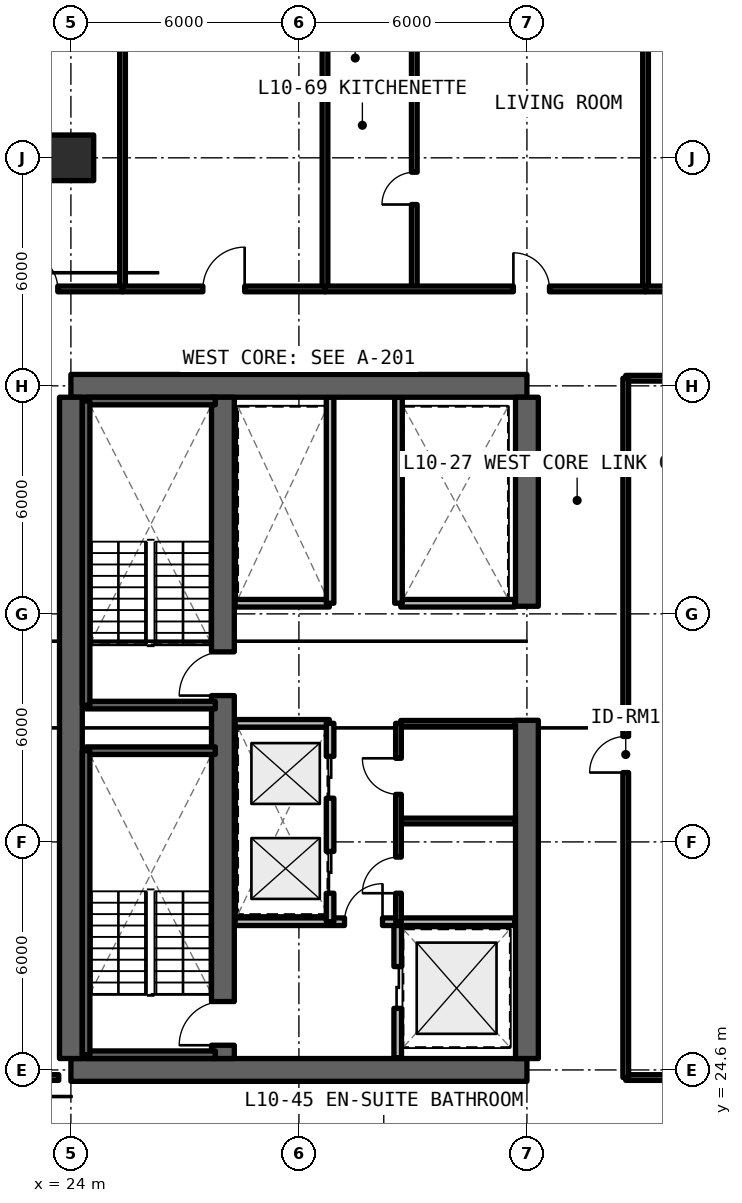
"""IFC4 building model, lengths in metres.
Left out: names, types, materials, properties, quantities, classifications, styles, units other than length and angle.
Written with IfcOpenShell. Run it as: python <this file> out.ifc"""

import sys

from ifc_helpers import new_model, si_unit, direction, frame, frame_2d, origin, origin_2d, place, context, subcontext, project, spatial, rectangle, extrude, element, fill, save


model = new_model("IFC4")
c1 = context("Model", 3, precision=1e-05, world=origin(), true_north=direction((0.0, 1.0)))
c2 = subcontext(c1, "Body", "Model", "MODEL_VIEW")
j1 = project(units=[si_unit("LENGTHUNIT", "METRE"), si_unit("PLANEANGLEUNIT", "RADIAN")], contexts=[c1])
p1 = place(None, origin())
s1 = spatial("IfcSite", under=j1, at=p1, CompositionType="ELEMENT")
p2 = place(p1, origin())
s2 = spatial("IfcBuilding", under=s1, at=p2, CompositionType="ELEMENT")
p3 = place(p2, frame((0.0, 0.0, 38.94)))
s3 = spatial("IfcBuildingStorey", under=s2, at=p3, CompositionType="ELEMENT", Elevation=38.94)
for number, where, z_axis, x_axis in (
    (1, (24.0, 24.6, 0.0), (0.0, 0.0, 1.0), (1.0, 0.0, 0.0)),
    (2, (36.0, 42.6, 0.0), (0.0, 0.0, 1.0), (-1.0, 0.0, 0.0)),
):
    element("IfcWall", number, at=place(p3, frame(where, z_axis=z_axis, x_axis=x_axis)), inside=s3, PredefinedType="SHEAR", context=c2, shape_type="SweptSolid", body=[
        extrude(rectangle(XDim=12.0, YDim=0.6, at=frame_2d((6.0, 0.0))), origin(), (0.0, 0.0, 1.0), 3.3),
    ])
p4 = place(p3, frame((24.0, 24.9, 0.0), z_axis=(0.0, 0.0, 1.0), x_axis=(0.0, 1.0, 0.0)))
e3 = element("IfcWall", 3, at=p4, inside=s3, PredefinedType="SHEAR", context=c2, shape_type="SweptSolid", body=[
    extrude(rectangle(XDim=17.4, YDim=0.6, at=frame_2d((8.7, 0.0))), origin(), (0.0, 0.0, 1.0), 3.3),
])
p5 = place(p3, frame((36.0, 24.9, 0.0), z_axis=(0.0, 0.0, 1.0), x_axis=(0.0, 1.0, 0.0)))
e4 = element("IfcWall", 4, at=p5, inside=s3, PredefinedType="SHEAR", context=c2, shape_type="SweptSolid", body=[
    extrude(rectangle(XDim=8.9, YDim=0.6, at=frame_2d((4.45, 0.0))), origin(), (0.0, 0.0, 1.0), 3.3),
])
p6 = place(p3, frame((36.0, 36.8, 0.0), z_axis=(0.0, 0.0, 1.0), x_axis=(0.0, 1.0, 0.0)))
e5 = element("IfcWall", 5, at=p6, inside=s3, PredefinedType="SHEAR", context=c2, shape_type="SweptSolid", body=[
    extrude(rectangle(XDim=5.5, YDim=0.6, at=frame_2d((2.75, 0.0))), origin(), (0.0, 0.0, 1.0), 3.3),
])
p7 = place(p3, frame((28.0, 24.9, 0.0), z_axis=(0.0, 0.0, 1.0), x_axis=(0.0, 1.0, 0.0)))
e6 = element("IfcWall", 6, at=p7, inside=s3, PredefinedType="SHEAR", context=c2, shape_type="SweptSolid", body=[
    extrude(rectangle(XDim=17.4, YDim=0.6, at=frame_2d((8.7, 0.0))), origin(), (0.0, 0.0, 1.0), 3.3),
])
p8 = place(p7, frame((0.35, 0.0, 0.0)))
e7 = element("IfcOpeningElement", 7, at=p8, cuts=e6, PredefinedType="OPENING", context=c2, shape_type="SweptSolid", body=[
    extrude(rectangle(XDim=1.15, YDim=2.15, at=frame_2d((0.575, 1.075))), frame((0.0, 0.31, 0.0), z_axis=(0.0, -1.0, 0.0), x_axis=(1.0, 0.0, 0.0)), (0.0, 0.0, 1.0), 0.62),
])
p9 = place(p7, frame((9.55, 0.0, 0.0)))
e8 = element("IfcOpeningElement", 8, at=p9, cuts=e6, PredefinedType="OPENING", context=c2, shape_type="SweptSolid", body=[
    extrude(rectangle(XDim=1.15, YDim=2.15, at=frame_2d((0.575, 1.075))), frame((0.0, 0.31, 0.0), z_axis=(0.0, -1.0, 0.0), x_axis=(1.0, 0.0, 0.0)), (0.0, 0.0, 1.0), 0.62),
])
p10 = place(p3, frame((24.0, 48.6, 0.0), z_axis=(0.0, 0.0, 1.0), x_axis=(1.0, 0.0, 0.0)))
e9 = element("IfcColumn", 9, at=p10, inside=s3, PredefinedType="COLUMN", context=c2, shape_type="SweptSolid", body=[
    extrude(rectangle(XDim=1.2, YDim=1.2, at=origin_2d()), origin(), (0.0, 0.0, 1.0), 3.3),
])
p11 = place(p3, frame((32.6, 24.92, 0.0), z_axis=(0.0, 0.0, 1.0), x_axis=(0.0, 1.0, 0.0)))
e10 = element("IfcWall", 10, at=p11, inside=s3, PredefinedType="SOLIDWALL", context=c2, shape_type="SweptSolid", body=[
    extrude(rectangle(XDim=3.58, YDim=0.2, at=frame_2d((1.79, 0.0))), origin(), (0.0, 0.0, 1.0), 2.35),
])
p12 = place(p11, frame((1.3, 0.0, 0.0)))
e11 = element("IfcOpeningElement", 11, at=p12, cuts=e10, PredefinedType="OPENING", context=c2, shape_type="SweptSolid", body=[
    extrude(rectangle(XDim=1.1, YDim=2.2, at=frame_2d((0.55, 1.1))), frame((0.0, 0.11, 0.0), z_axis=(0.0, -1.0, 0.0), x_axis=(1.0, 0.0, 0.0)), (0.0, 0.0, 1.0), 0.22),
])
p13 = place(p3, frame((28.32, 28.5, 0.0), z_axis=(0.0, 0.0, 1.0), x_axis=(1.0, 0.0, 0.0)))
e12 = element("IfcWall", 12, at=p13, inside=s3, PredefinedType="SOLIDWALL", context=c2, shape_type="SweptSolid", body=[
    extrude(rectangle(XDim=7.36, YDim=0.2, at=frame_2d((3.68, 0.0))), origin(), (0.0, 0.0, 1.0), 2.35),
])
p14 = place(p13, frame((2.88, 0.0, 0.0)))
e13 = element("IfcOpeningElement", 13, at=p14, cuts=e12, PredefinedType="OPENING", context=c2, shape_type="SweptSolid", body=[
    extrude(rectangle(XDim=1.0, YDim=2.15, at=frame_2d((0.5, 1.075))), frame((0.0, 0.11, 0.0), z_axis=(0.0, -1.0, 0.0), x_axis=(1.0, 0.0, 0.0)), (0.0, 0.0, 1.0), 0.22),
])
p15 = place(p3, frame((28.32, 33.72, 0.0), z_axis=(0.0, 0.0, 1.0), x_axis=(1.0, 0.0, 0.0)))
e14 = element("IfcWall", 14, at=p15, inside=s3, PredefinedType="SOLIDWALL", context=c2, shape_type="SweptSolid", body=[
    extrude(rectangle(XDim=2.48, YDim=0.2, at=frame_2d((1.24, 0.0))), origin(), (0.0, 0.0, 1.0), 2.35),
])
p16 = place(p3, frame((30.82, 28.5, 0.0), z_axis=(0.0, 0.0, 1.0), x_axis=(0.0, 1.0, 0.0)))
e15 = element("IfcWall", 15, at=p16, inside=s3, PredefinedType="SOLIDWALL", context=c2, shape_type="SweptSolid", body=[
    extrude(rectangle(XDim=5.22, YDim=0.2, at=frame_2d((2.61, 0.0))), origin(), (0.0, 0.0, 1.0), 2.35),
])
p17 = place(p16, frame((0.75, 0.0, 0.0)))
e16 = element("IfcOpeningElement", 16, at=p17, cuts=e15, PredefinedType="OPENING", context=c2, shape_type="SweptSolid", body=[
    extrude(rectangle(XDim=1.1, YDim=2.2, at=frame_2d((0.55, 1.1))), frame((0.0, 0.11, 0.0), z_axis=(0.0, -1.0, 0.0), x_axis=(1.0, 0.0, 0.0)), (0.0, 0.0, 1.0), 0.22),
])
p18 = place(p16, frame((3.25, 0.0, 0.0)))
e17 = element("IfcOpeningElement", 17, at=p18, cuts=e15, PredefinedType="OPENING", context=c2, shape_type="SweptSolid", body=[
    extrude(rectangle(XDim=1.1, YDim=2.2, at=frame_2d((0.55, 1.1))), frame((0.0, 0.11, 0.0), z_axis=(0.0, -1.0, 0.0), x_axis=(1.0, 0.0, 0.0)), (0.0, 0.0, 1.0), 0.22),
])
for number, where, z_axis, x_axis in (
    (18, (32.68, 31.15, 0.0), (0.0, 0.0, 1.0), (1.0, 0.0, 0.0)),
    (19, (32.68, 33.72, 0.0), (0.0, 0.0, 1.0), (1.0, 0.0, 0.0)),
):
    element("IfcWall", number, at=place(p3, frame(where, z_axis=z_axis, x_axis=x_axis)), inside=s3, PredefinedType="SOLIDWALL", context=c2, shape_type="SweptSolid", body=[
        extrude(rectangle(XDim=3.0, YDim=0.15, at=frame_2d((1.5, 0.0))), origin(), (0.0, 0.0, 1.0), 2.35),
    ])
p19 = place(p3, frame((32.62, 28.5, 0.0), z_axis=(0.0, 0.0, 1.0), x_axis=(0.0, 1.0, 0.0)))
e20 = element("IfcWall", 20, at=p19, inside=s3, PredefinedType="SOLIDWALL", context=c2, shape_type="SweptSolid", body=[
    extrude(rectangle(XDim=5.22, YDim=0.15, at=frame_2d((2.61, 0.0))), origin(), (0.0, 0.0, 1.0), 2.35),
])
p20 = place(p19, frame((0.75, 0.0, 0.0)))
e21 = element("IfcOpeningElement", 21, at=p20, cuts=e20, PredefinedType="OPENING", context=c2, shape_type="SweptSolid", body=[
    extrude(rectangle(XDim=0.95, YDim=2.15, at=frame_2d((0.475, 1.075))), frame((0.0, 0.085, 0.0), z_axis=(0.0, -1.0, 0.0), x_axis=(1.0, 0.0, 0.0)), (0.0, 0.0, 1.0), 0.17),
])
p21 = place(p19, frame((3.35, 0.0, 0.0)))
e22 = element("IfcOpeningElement", 22, at=p21, cuts=e20, PredefinedType="OPENING", context=c2, shape_type="SweptSolid", body=[
    extrude(rectangle(XDim=0.95, YDim=2.15, at=frame_2d((0.475, 1.075))), frame((0.0, 0.085, 0.0), z_axis=(0.0, -1.0, 0.0), x_axis=(1.0, 0.0, 0.0)), (0.0, 0.0, 1.0), 0.17),
])
p22 = place(p3, frame((28.32, 36.88, 0.0), z_axis=(0.0, 0.0, 1.0), x_axis=(1.0, 0.0, 0.0)))
e23 = element("IfcWall", 23, at=p22, inside=s3, PredefinedType="SOLIDWALL", context=c2, shape_type="SweptSolid", body=[
    extrude(rectangle(XDim=2.48, YDim=0.2, at=frame_2d((1.24, 0.0))), origin(), (0.0, 0.0, 1.0), 2.35),
])
p23 = place(p3, frame((30.82, 36.88, 0.0), z_axis=(0.0, 0.0, 1.0), x_axis=(0.0, 1.0, 0.0)))
e24 = element("IfcWall", 24, at=p23, inside=s3, PredefinedType="SOLIDWALL", context=c2, shape_type="SweptSolid", body=[
    extrude(rectangle(XDim=5.42, YDim=0.2, at=frame_2d((2.71, 0.0))), origin(), (0.0, 0.0, 1.0), 2.35),
])
p24 = place(p3, frame((32.68, 36.88, 0.0), z_axis=(0.0, 0.0, 1.0), x_axis=(1.0, 0.0, 0.0)))
e25 = element("IfcWall", 25, at=p24, inside=s3, PredefinedType="SOLIDWALL", context=c2, shape_type="SweptSolid", body=[
    extrude(rectangle(XDim=3.0, YDim=0.2, at=frame_2d((1.5, 0.0))), origin(), (0.0, 0.0, 1.0), 2.35),
])
p25 = place(p3, frame((32.62, 36.88, 0.0), z_axis=(0.0, 0.0, 1.0), x_axis=(0.0, 1.0, 0.0)))
e26 = element("IfcWall", 26, at=p25, inside=s3, PredefinedType="SOLIDWALL", context=c2, shape_type="SweptSolid", body=[
    extrude(rectangle(XDim=5.42, YDim=0.2, at=frame_2d((2.71, 0.0))), origin(), (0.0, 0.0, 1.0), 2.35),
])
for number, where, z_axis, x_axis in (
    (27, (38.6, 24.4, 0.0), (0.0, 0.0, 1.0), (1.0, 0.0, 0.0)),
    (28, (38.6, 42.8, 0.0), (0.0, 0.0, 1.0), (1.0, 0.0, 0.0)),
):
    element("IfcWall", number, at=place(p3, frame(where, z_axis=z_axis, x_axis=x_axis)), inside=s3, PredefinedType="SOLIDWALL", context=c2, shape_type="SweptSolid", body=[
        extrude(rectangle(XDim=8.25, YDim=0.15, at=frame_2d((4.125, 0.0))), origin(), (0.0, 0.0, 1.0), 2.295),
    ])
p26 = place(p3, frame((38.6, 24.4, 0.0), z_axis=(0.0, 0.0, 1.0), x_axis=(0.0, 1.0, 0.0)))
e29 = element("IfcWall", 29, at=p26, inside=s3, PredefinedType="SOLIDWALL", context=c2, shape_type="SweptSolid", body=[
    extrude(rectangle(XDim=18.4, YDim=0.15, at=frame_2d((9.2, 0.0))), origin(), (0.0, 0.0, 1.0), 2.35),
])
p27 = place(p26, frame((8.025, 0.0, 0.0)))
e30 = element("IfcOpeningElement", 30, at=p27, cuts=e29, PredefinedType="OPENING", context=c2, shape_type="SweptSolid", body=[
    extrude(rectangle(XDim=0.95, YDim=2.15, at=frame_2d((0.475, 1.075))), frame((0.0, 0.085, 0.0), z_axis=(0.0, -1.0, 0.0), x_axis=(1.0, 0.0, 0.0)), (0.0, 0.0, 1.0), 0.17),
])
p28 = place(p3, frame((16.84, 24.4, 0.0), z_axis=(0.0, 0.0, 1.0), x_axis=(1.0, 0.0, 0.0)))
e31 = element("IfcWall", 31, at=p28, inside=s3, PredefinedType="SOLIDWALL", context=c2, shape_type="SweptSolid", body=[
    extrude(rectangle(XDim=6.84, YDim=0.15, at=frame_2d((3.42, 0.0))), origin(), (0.0, 0.0, 1.0), 2.295),
])
p29 = place(p28, frame((2.945, 0.0, 0.0)))
e32 = element("IfcOpeningElement", 32, at=p29, cuts=e31, PredefinedType="OPENING", context=c2, shape_type="SweptSolid", body=[
    extrude(rectangle(XDim=0.95, YDim=2.15, at=frame_2d((0.475, 1.075))), frame((0.0, 0.085, 0.0), z_axis=(0.0, -1.0, 0.0), x_axis=(1.0, 0.0, 0.0)), (0.0, 0.0, 1.0), 0.17),
])
p30 = place(p3, frame((25.359, 45.15, 0.0), z_axis=(0.0, 0.0, 1.0), x_axis=(0.0, 1.0, 0.0)))
e33 = element("IfcWall", 33, at=p30, inside=s3, PredefinedType="SOLIDWALL", context=c2, shape_type="SweptSolid", body=[
    extrude(rectangle(XDim=14.17, YDim=0.15, at=frame_2d((7.085, 0.0))), origin(), (0.0, 0.0, 1.0), 2.35),
])
p31 = place(p3, frame((21.0, 45.15, 0.0), z_axis=(0.0, 0.0, 1.0), x_axis=(1.0, 0.0, 0.0)))
e34 = element("IfcWall", 34, at=p31, inside=s3, PredefinedType="SOLIDWALL", context=c2, shape_type="SweptSolid", body=[
    extrude(rectangle(XDim=4.359, YDim=0.15, at=frame_2d((2.179, 0.0))), origin(), (0.0, 0.0, 1.0), 2.35),
])
p32 = place(p31, frame((1.704, 0.0, 0.0)))
e35 = element("IfcOpeningElement", 35, at=p32, cuts=e34, PredefinedType="OPENING", context=c2, shape_type="SweptSolid", body=[
    extrude(rectangle(XDim=0.95, YDim=2.15, at=frame_2d((0.475, 1.075))), frame((0.0, 0.085, 0.0), z_axis=(0.0, -1.0, 0.0), x_axis=(1.0, 0.0, 0.0)), (0.0, 0.0, 1.0), 0.17),
])
p33 = place(p3, frame((30.686, 45.15, 0.0), z_axis=(0.0, 0.0, 1.0), x_axis=(0.0, 1.0, 0.0)))
e36 = element("IfcWall", 36, at=p33, inside=s3, PredefinedType="SOLIDWALL", context=c2, shape_type="SweptSolid", body=[
    extrude(rectangle(XDim=14.17, YDim=0.15, at=frame_2d((7.085, 0.0))), origin(), (0.0, 0.0, 1.0), 2.35),
])
p34 = place(p3, frame((25.359, 45.15, 0.0), z_axis=(0.0, 0.0, 1.0), x_axis=(1.0, 0.0, 0.0)))
e37 = element("IfcWall", 37, at=p34, inside=s3, PredefinedType="SOLIDWALL", context=c2, shape_type="SweptSolid", body=[
    extrude(rectangle(XDim=5.327, YDim=0.15, at=frame_2d((2.664, 0.0))), origin(), (0.0, 0.0, 1.0), 2.35),
])
p35 = place(p34, frame((2.114, 0.0, 0.0)))
e38 = element("IfcOpeningElement", 38, at=p35, cuts=e37, PredefinedType="OPENING", context=c2, shape_type="SweptSolid", body=[
    extrude(rectangle(XDim=1.1, YDim=2.15, at=frame_2d((0.55, 1.075))), frame((0.0, 0.085, 0.0), z_axis=(0.0, -1.0, 0.0), x_axis=(1.0, 0.0, 0.0)), (0.0, 0.0, 1.0), 0.17),
])
p36 = place(p3, frame((39.121, 45.15, 0.0), z_axis=(0.0, 0.0, 1.0), x_axis=(0.0, 1.0, 0.0)))
e39 = element("IfcWall", 39, at=p36, inside=s3, PredefinedType="SOLIDWALL", context=c2, shape_type="SweptSolid", body=[
    extrude(rectangle(XDim=14.17, YDim=0.15, at=frame_2d((7.085, 0.0))), origin(), (0.0, 0.0, 1.0), 2.35),
])
p37 = place(p3, frame((30.686, 50.442, 0.0), z_axis=(0.0, 0.0, 1.0), x_axis=(1.0, 0.0, 0.0)))
e40 = element("IfcWall", 40, at=p37, inside=s3, PredefinedType="PARTITIONING", context=c2, shape_type="SweptSolid", body=[
    extrude(rectangle(XDim=2.35, YDim=0.15, at=frame_2d((1.175, 0.0))), origin(), (0.0, 0.0, 1.0), 2.35),
])
p38 = place(p3, frame((33.036, 45.15, 0.0), z_axis=(0.0, 0.0, 1.0), x_axis=(0.0, 1.0, 0.0)))
e41 = element("IfcWall", 41, at=p38, inside=s3, PredefinedType="PARTITIONING", context=c2, shape_type="SweptSolid", body=[
    extrude(rectangle(XDim=8.97, YDim=0.15, at=frame_2d((4.485, 0.0))), origin(), (0.0, 0.0, 1.0), 2.35),
])
p39 = place(p38, frame((2.221, 0.0, 0.0)))
e42 = element("IfcOpeningElement", 42, at=p39, cuts=e41, PredefinedType="OPENING", context=c2, shape_type="SweptSolid", body=[
    extrude(rectangle(XDim=0.85, YDim=2.1, at=frame_2d((0.425, 1.05))), frame((0.0, 0.085, 0.0), z_axis=(0.0, -1.0, 0.0), x_axis=(1.0, 0.0, 0.0)), (0.0, 0.0, 1.0), 0.17),
])
p40 = place(p38, frame((6.706, 0.0, 0.0)))
e43 = element("IfcOpeningElement", 43, at=p40, cuts=e41, PredefinedType="OPENING", context=c2, shape_type="SweptSolid", body=[
    extrude(rectangle(XDim=0.85, YDim=2.1, at=frame_2d((0.425, 1.05))), frame((0.0, 0.085, 0.0), z_axis=(0.0, -1.0, 0.0), x_axis=(1.0, 0.0, 0.0)), (0.0, 0.0, 1.0), 0.17),
])
p41 = place(p3, frame((30.686, 45.15, 0.0), z_axis=(0.0, 0.0, 1.0), x_axis=(1.0, 0.0, 0.0)))
e44 = element("IfcWall", 44, at=p41, inside=s3, PredefinedType="SOLIDWALL", context=c2, shape_type="SweptSolid", body=[
    extrude(rectangle(XDim=8.435, YDim=0.15, at=frame_2d((4.217, 0.0))), origin(), (0.0, 0.0, 1.0), 2.35),
])
p42 = place(p41, frame((4.958, 0.0, 0.0)))
e45 = element("IfcOpeningElement", 45, at=p42, cuts=e44, PredefinedType="OPENING", context=c2, shape_type="SweptSolid", body=[
    extrude(rectangle(XDim=0.95, YDim=2.15, at=frame_2d((0.475, 1.075))), frame((0.0, 0.085, 0.0), z_axis=(0.0, -1.0, 0.0), x_axis=(1.0, 0.0, 0.0)), (0.0, 0.0, 1.0), 0.17),
])
p43 = place(p3, frame((39.121, 45.15, 0.0), z_axis=(0.0, 0.0, 1.0), x_axis=(1.0, 0.0, 0.0)))
e46 = element("IfcWall", 46, at=p43, inside=s3, PredefinedType="SOLIDWALL", context=c2, shape_type="SweptSolid", body=[
    extrude(rectangle(XDim=4.359, YDim=0.15, at=frame_2d((2.179, 0.0))), origin(), (0.0, 0.0, 1.0), 2.35),
])
p44 = place(p43, frame((1.704, 0.0, 0.0)))
e47 = element("IfcOpeningElement", 47, at=p44, cuts=e46, PredefinedType="OPENING", context=c2, shape_type="SweptSolid", body=[
    extrude(rectangle(XDim=0.95, YDim=2.15, at=frame_2d((0.475, 1.075))), frame((0.0, 0.085, 0.0), z_axis=(0.0, -1.0, 0.0), x_axis=(1.0, 0.0, 0.0)), (0.0, 0.0, 1.0), 0.17),
])
for number, where, z_axis, x_axis in (
    (48, (24.4, 25.0, 0.0), (0.0, 0.0, 1.0), (1.0, 0.0, 0.0)),
    (49, (27.8, 33.0, 0.0), (0.0, 0.0, 1.0), (-1.0, 0.0, 0.0)),
):
    element("IfcWall", number, at=place(p3, frame(where, z_axis=z_axis, x_axis=x_axis)), inside=s3, PredefinedType="SOLIDWALL", context=c2, shape_type="SweptSolid", body=[
        extrude(rectangle(XDim=3.4, YDim=0.2, at=frame_2d((1.7, 0.0))), origin(), (0.0, 0.0, 1.0), 3.3),
    ])
p45 = place(p3, frame((24.4, 33.0, 0.0), z_axis=(0.0, 0.0, 1.0), x_axis=(0.0, -1.0, 0.0)))
e50 = element("IfcWall", 50, at=p45, inside=s3, PredefinedType="SOLIDWALL", context=c2, shape_type="SweptSolid", body=[
    extrude(rectangle(XDim=8.0, YDim=0.2, at=frame_2d((4.0, 0.0))), origin(), (0.0, 0.0, 1.0), 3.3),
])
for number, where, z_axis, x_axis in (
    (51, (24.4, 34.2, 0.0), (0.0, 0.0, 1.0), (1.0, 0.0, 0.0)),
    (52, (27.8, 42.2, 0.0), (0.0, 0.0, 1.0), (-1.0, 0.0, 0.0)),
):
    element("IfcWall", number, at=place(p3, frame(where, z_axis=z_axis, x_axis=x_axis)), inside=s3, PredefinedType="SOLIDWALL", context=c2, shape_type="SweptSolid", body=[
        extrude(rectangle(XDim=3.4, YDim=0.2, at=frame_2d((1.7, 0.0))), origin(), (0.0, 0.0, 1.0), 3.3),
    ])
p46 = place(p3, frame((24.4, 42.2, 0.0), z_axis=(0.0, 0.0, 1.0), x_axis=(0.0, -1.0, 0.0)))
e53 = element("IfcWall", 53, at=p46, inside=s3, PredefinedType="SOLIDWALL", context=c2, shape_type="SweptSolid", body=[
    extrude(rectangle(XDim=8.0, YDim=0.2, at=frame_2d((4.0, 0.0))), origin(), (0.0, 0.0, 1.0), 3.3),
])
p47 = place(p12, origin())
e54 = element("IfcDoor", 54, at=p47, inside=s3, OperationType="SLIDING_TO_LEFT", PredefinedType="DOOR", context=c2, shape_type="SweptSolid", body=[
    extrude(rectangle(XDim=1.1, YDim=2.2, at=frame_2d((0.55, 1.1))), frame((0.0, 0.025, 0.0), z_axis=(0.0, -1.0, 0.0), x_axis=(1.0, 0.0, 0.0)), (0.0, 0.0, 1.0), 0.05),
])
fill(e11, e54)
p48 = place(p14, origin())
e55 = element("IfcDoor", 55, at=p48, inside=s3, OperationType="SINGLE_SWING_RIGHT", PredefinedType="DOOR", context=c2, shape_type="SweptSolid", body=[
    extrude(rectangle(XDim=1.0, YDim=2.15, at=frame_2d((0.5, 1.075))), frame((0.0, 0.025, 0.0), z_axis=(0.0, -1.0, 0.0), x_axis=(1.0, 0.0, 0.0)), (0.0, 0.0, 1.0), 0.05),
])
fill(e13, e55)
p49 = place(p17, origin())
e56 = element("IfcDoor", 56, at=p49, inside=s3, OperationType="SLIDING_TO_LEFT", PredefinedType="DOOR", context=c2, shape_type="SweptSolid", body=[
    extrude(rectangle(XDim=1.1, YDim=2.2, at=frame_2d((0.55, 1.1))), frame((0.0, 0.025, 0.0), z_axis=(0.0, -1.0, 0.0), x_axis=(1.0, 0.0, 0.0)), (0.0, 0.0, 1.0), 0.05),
])
fill(e16, e56)
p50 = place(p18, origin())
e57 = element("IfcDoor", 57, at=p50, inside=s3, OperationType="SLIDING_TO_RIGHT", PredefinedType="DOOR", context=c2, shape_type="SweptSolid", body=[
    extrude(rectangle(XDim=1.1, YDim=2.2, at=frame_2d((0.55, 1.1))), frame((0.0, 0.025, 0.0), z_axis=(0.0, -1.0, 0.0), x_axis=(1.0, 0.0, 0.0)), (0.0, 0.0, 1.0), 0.05),
])
fill(e17, e57)
p51 = place(p20, origin())
e58 = element("IfcDoor", 58, at=p51, inside=s3, OperationType="SINGLE_SWING_LEFT", PredefinedType="DOOR", context=c2, shape_type="SweptSolid", body=[
    extrude(rectangle(XDim=0.95, YDim=2.15, at=frame_2d((0.475, 1.075))), frame((0.0, 0.025, 0.0), z_axis=(0.0, -1.0, 0.0), x_axis=(1.0, 0.0, 0.0)), (0.0, 0.0, 1.0), 0.05),
])
fill(e21, e58)
p52 = place(p21, origin())
e59 = element("IfcDoor", 59, at=p52, inside=s3, OperationType="SINGLE_SWING_RIGHT", PredefinedType="DOOR", context=c2, shape_type="SweptSolid", body=[
    extrude(rectangle(XDim=0.95, YDim=2.15, at=frame_2d((0.475, 1.075))), frame((0.0, 0.025, 0.0), z_axis=(0.0, -1.0, 0.0), x_axis=(1.0, 0.0, 0.0)), (0.0, 0.0, 1.0), 0.05),
])
fill(e22, e59)
p53 = place(p27, origin())
e60 = element("IfcDoor", 60, at=p53, inside=s3, OperationType="SINGLE_SWING_LEFT", PredefinedType="DOOR", context=c2, shape_type="SweptSolid", body=[
    extrude(rectangle(XDim=0.95, YDim=2.15, at=frame_2d((0.475, 1.075))), frame((0.0, 0.025, 0.0), z_axis=(0.0, -1.0, 0.0), x_axis=(1.0, 0.0, 0.0)), (0.0, 0.0, 1.0), 0.05),
])
fill(e30, e60)
p54 = place(p32, origin())
e61 = element("IfcDoor", 61, at=p54, inside=s3, OperationType="SINGLE_SWING_LEFT", PredefinedType="DOOR", context=c2, shape_type="SweptSolid", body=[
    extrude(rectangle(XDim=0.95, YDim=2.15, at=frame_2d((0.475, 1.075))), frame((0.0, 0.025, 0.0), z_axis=(0.0, -1.0, 0.0), x_axis=(1.0, 0.0, 0.0)), (0.0, 0.0, 1.0), 0.05),
])
fill(e35, e61)
p55 = place(p35, origin())
e62 = element("IfcDoor", 62, at=p55, inside=s3, OperationType="SINGLE_SWING_RIGHT", PredefinedType="DOOR", context=c2, shape_type="SweptSolid", body=[
    extrude(rectangle(XDim=1.1, YDim=2.15, at=frame_2d((0.55, 1.075))), frame((0.0, 0.025, 0.0), z_axis=(0.0, -1.0, 0.0), x_axis=(1.0, 0.0, 0.0)), (0.0, 0.0, 1.0), 0.05),
])
fill(e38, e62)
p56 = place(p39, origin())
e63 = element("IfcDoor", 63, at=p56, inside=s3, OperationType="SINGLE_SWING_LEFT", PredefinedType="DOOR", context=c2, shape_type="SweptSolid", body=[
    extrude(rectangle(XDim=0.85, YDim=2.1, at=frame_2d((0.425, 1.05))), frame((0.0, 0.025, 0.0), z_axis=(0.0, -1.0, 0.0), x_axis=(1.0, 0.0, 0.0)), (0.0, 0.0, 1.0), 0.05),
])
fill(e42, e63)
p57 = place(p42, origin())
e64 = element("IfcDoor", 64, at=p57, inside=s3, OperationType="SINGLE_SWING_LEFT", PredefinedType="DOOR", context=c2, shape_type="SweptSolid", body=[
    extrude(rectangle(XDim=0.95, YDim=2.15, at=frame_2d((0.475, 1.075))), frame((0.0, 0.025, 0.0), z_axis=(0.0, -1.0, 0.0), x_axis=(1.0, 0.0, 0.0)), (0.0, 0.0, 1.0), 0.05),
])
fill(e45, e64)
p58 = place(p8, origin())
e65 = element("IfcDoor", 65, at=p58, inside=s3, OperationType="SINGLE_SWING_RIGHT", PredefinedType="DOOR", context=c2, shape_type="SweptSolid", body=[
    extrude(rectangle(XDim=1.15, YDim=2.15, at=frame_2d((0.575, 1.075))), frame((0.0, 0.025, 0.0), z_axis=(0.0, -1.0, 0.0), x_axis=(1.0, 0.0, 0.0)), (0.0, 0.0, 1.0), 0.05),
])
fill(e7, e65)
p59 = place(p9, origin())
e66 = element("IfcDoor", 66, at=p59, inside=s3, OperationType="SINGLE_SWING_LEFT", PredefinedType="DOOR", context=c2, shape_type="SweptSolid", body=[
    extrude(rectangle(XDim=1.15, YDim=2.15, at=frame_2d((0.575, 1.075))), frame((0.0, 0.025, 0.0), z_axis=(0.0, -1.0, 0.0), x_axis=(1.0, 0.0, 0.0)), (0.0, 0.0, 1.0), 0.05),
])
fill(e8, e66)
save(model, sys.argv[1])
